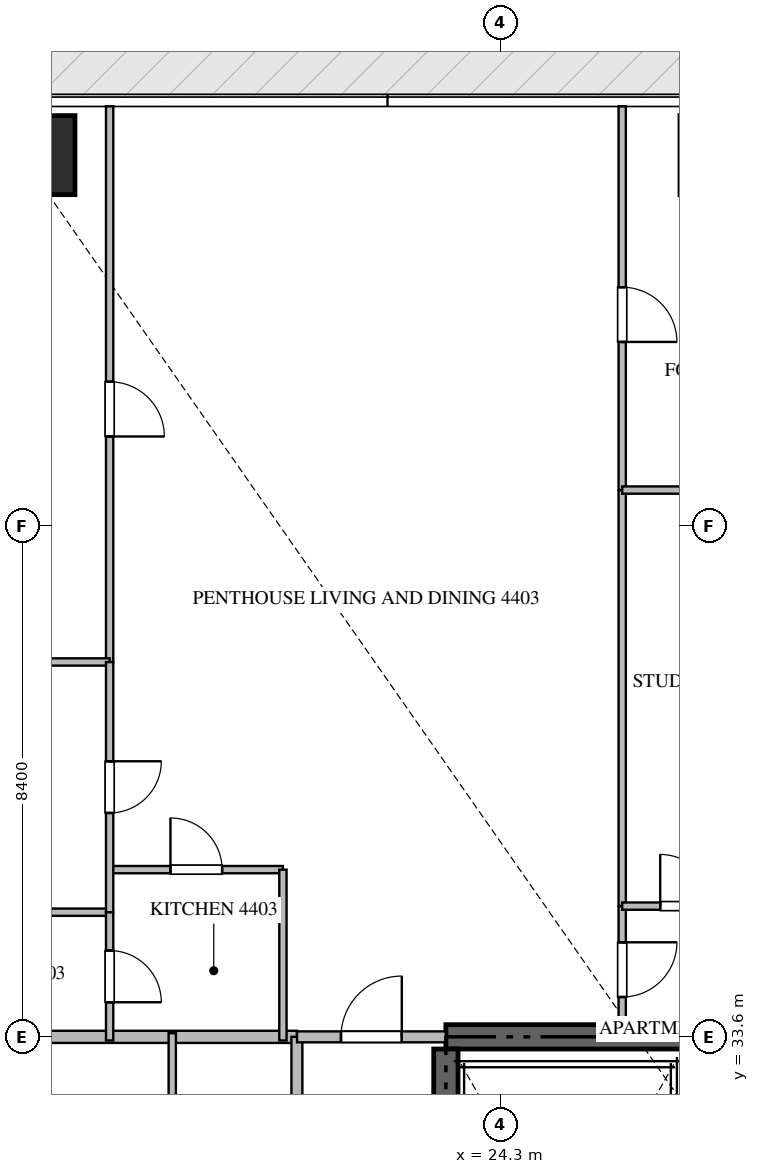
"""IFC4 building model, lengths in metres.
Left out: names, types, materials, properties, quantities, classifications, styles, units other than length and angle.
Written with IfcOpenShell. Run it as: python <this file> out.ifc"""

import sys

from ifc_helpers import new_model, si_unit, direction, frame, frame_2d, origin, origin_2d, place, context, subcontext, project, spatial, rectangle, extrude, source, transform, mapped, element, fill, save


model = new_model("IFC4")
c1 = context("Model", 3, precision=1e-05, world=origin(), true_north=direction((0.0, 1.0)))
c2 = subcontext(c1, "Body", "Model", "MODEL_VIEW")
j1 = project(units=[si_unit("LENGTHUNIT", "METRE"), si_unit("PLANEANGLEUNIT", "RADIAN")], contexts=[c1])
p1 = place(None, origin())
s1 = spatial("IfcSite", under=j1, at=p1, CompositionType="ELEMENT")
p2 = place(p1, origin())
s2 = spatial("IfcBuilding", under=s1, at=p2, CompositionType="ELEMENT")
p3 = place(p2, frame((0.0, 0.0, 176.4)))
s3 = spatial("IfcBuildingStorey", under=s2, at=p3, CompositionType="ELEMENT", Elevation=176.4)
p4 = place(p3, frame((41.4, 33.6, -0.26), z_axis=(0.0, 0.0, 1.0), x_axis=(-1.0, 0.0, 0.0)))
e1 = element("IfcWall", 1, at=p4, inside=s3, PredefinedType="SHEAR", context=c2, shape_type="SweptSolid", body=[
    extrude(rectangle(XDim=18.0, YDim=0.4, at=frame_2d((9.0, 0.0))), origin(), (0.0, 0.0, 1.0), 3.748),
])
p5 = place(p3, frame((23.4, 24.25, -0.26), z_axis=(0.0, 0.0, 1.0), x_axis=(0.0, 1.0, 0.0)))
e2 = element("IfcWall", 2, at=p5, inside=s3, PredefinedType="SHEAR", context=c2, shape_type="SweptSolid", body=[
    extrude(rectangle(XDim=9.15, YDim=0.4, at=frame_2d((4.575, 0.0))), origin(), (0.0, 0.0, 1.0), 3.748),
])
m1 = source(origin(), c2, "Body", "SweptSolid", [
    extrude(rectangle(XDim=1.3, YDim=1.3, at=origin_2d()), origin(), (0.0, 0.0, 1.0), 3.75),
])
p6 = place(p3, frame((16.65, 48.1, -0.26), z_axis=(0.0, 0.0, 1.0), x_axis=(1.0, 0.0, 0.0)))
e3 = element("IfcColumn", 3, at=p6, inside=s3, PredefinedType="COLUMN", context=c2, shape_type="MappedRepresentation", body=[
    mapped(m1, transform((0.0, 0.0, 0.0), scale=1.0)),
])
p7 = place(p3, frame((7.882, 33.6, 0.0), z_axis=(0.0, 0.0, 1.0), x_axis=(1.0, 0.0, 0.0)))
e4 = element("IfcWall", 4, at=p7, inside=s3, PredefinedType="PARTITIONING", context=c2, shape_type="SweptSolid", body=[
    extrude(rectangle(XDim=13.068, YDim=0.2, at=frame_2d((6.534, 0.0))), origin(), (0.0, 0.0, 1.0), 3.49),
])
p8 = place(p3, frame((20.95, 14.9, 0.0), z_axis=(0.0, 0.0, 1.0), x_axis=(0.0, 1.0, 0.0)))
e5 = element("IfcWall", 5, at=p8, inside=s3, PredefinedType="PARTITIONING", context=c2, shape_type="SweptSolid", body=[
    extrude(rectangle(XDim=18.7, YDim=0.18, at=frame_2d((9.35, 0.0))), origin(), (0.0, 0.0, 1.0), 3.49),
])
p9 = place(p8, frame((5.522, 0.0, 0.0)))
e6 = element("IfcOpeningElement", 6, at=p9, cuts=e5, PredefinedType="OPENING", context=c2, shape_type="SweptSolid", body=[
    extrude(rectangle(XDim=1.0, YDim=2.15, at=frame_2d((0.5, 1.075))), frame((0.0, 0.1, 0.0), z_axis=(0.0, -1.0, 0.0), x_axis=(1.0, 0.0, 0.0)), (0.0, 0.0, 1.0), 0.2),
])
p10 = place(p8, frame((10.602, 0.0, 0.0)))
e7 = element("IfcOpeningElement", 7, at=p10, cuts=e5, PredefinedType="OPENING", context=c2, shape_type="SweptSolid", body=[
    extrude(rectangle(XDim=1.0, YDim=2.15, at=frame_2d((0.5, 1.075))), frame((0.0, 0.1, 0.0), z_axis=(0.0, -1.0, 0.0), x_axis=(1.0, 0.0, 0.0)), (0.0, 0.0, 1.0), 0.2),
])
p11 = place(p3, frame((20.952, 33.6, 0.0), z_axis=(0.0, 0.0, 1.0), x_axis=(1.0, 0.0, 0.0)))
e8 = element("IfcWall", 8, at=p11, inside=s3, PredefinedType="PARTITIONING", context=c2, shape_type="SweptSolid", body=[
    extrude(rectangle(XDim=2.446, YDim=0.18, at=frame_2d((1.223, 0.0))), origin(), (0.0, 0.0, 1.0), 3.49),
])
p12 = place(p11, frame((0.723, 0.0, 0.0)))
e9 = element("IfcOpeningElement", 9, at=p12, cuts=e8, PredefinedType="OPENING", context=c2, shape_type="SweptSolid", body=[
    extrude(rectangle(XDim=1.0, YDim=2.15, at=frame_2d((0.5, 1.075))), frame((0.0, 0.1, 0.0), z_axis=(0.0, -1.0, 0.0), x_axis=(1.0, 0.0, 0.0)), (0.0, 0.0, 1.0), 0.2),
])
p13 = place(p3, frame((17.87, 36.35, 0.0), z_axis=(0.0, 0.0, 1.0), x_axis=(1.0, 0.0, 0.0)))
e10 = element("IfcWall", 10, at=p13, inside=s3, PredefinedType="PARTITIONING", context=c2, shape_type="SweptSolid", body=[
    extrude(rectangle(XDim=2.85, YDim=0.12, at=frame_2d((1.425, 0.0))), origin(), (0.0, 0.0, 1.0), 3.49),
])
p14 = place(p13, frame((1.0, 0.0, 0.0)))
e11 = element("IfcOpeningElement", 11, at=p14, cuts=e10, PredefinedType="OPENING", context=c2, shape_type="SweptSolid", body=[
    extrude(rectangle(XDim=0.85, YDim=2.1, at=frame_2d((0.425, 1.05))), frame((0.0, 0.07, 0.0), z_axis=(0.0, -1.0, 0.0), x_axis=(1.0, 0.0, 0.0)), (0.0, 0.0, 1.0), 0.14),
])
p15 = place(p3, frame((20.72, 36.35, 0.0), z_axis=(0.0, 0.0, 1.0), x_axis=(0.0, -1.0, 0.0)))
e12 = element("IfcWall", 12, at=p15, inside=s3, PredefinedType="PARTITIONING", context=c2, shape_type="SweptSolid", body=[
    extrude(rectangle(XDim=2.81, YDim=0.12, at=frame_2d((1.405, 0.0))), origin(), (0.0, 0.0, 1.0), 3.49),
])
p16 = place(p3, frame((17.87, 48.905, 0.0), z_axis=(0.0, 0.0, 1.0), x_axis=(0.0, -1.0, 0.0)))
e13 = element("IfcWall", 13, at=p16, inside=s3, PredefinedType="PARTITIONING", context=c2, shape_type="SweptSolid", body=[
    extrude(rectangle(XDim=9.14, YDim=0.12, at=frame_2d((4.57, 0.0))), origin(), (0.0, 0.0, 1.0), 3.49),
])
p17 = place(p16, frame((4.532, 0.0, 0.0)))
e14 = element("IfcOpeningElement", 14, at=p17, cuts=e13, PredefinedType="OPENING", context=c2, shape_type="SweptSolid", body=[
    extrude(rectangle(XDim=0.9, YDim=2.1, at=frame_2d((0.45, 1.05))), frame((0.0, 0.07, 0.0), z_axis=(0.0, -1.0, 0.0), x_axis=(1.0, 0.0, 0.0)), (0.0, 0.0, 1.0), 0.14),
])
p18 = place(p3, frame((7.895, 39.765, 0.0), z_axis=(0.0, 0.0, 1.0), x_axis=(1.0, 0.0, 0.0)))
e15 = element("IfcWall", 15, at=p18, inside=s3, PredefinedType="PARTITIONING", context=c2, shape_type="SweptSolid", body=[
    extrude(rectangle(XDim=9.975, YDim=0.12, at=frame_2d((4.988, 0.0))), origin(), (0.0, 0.0, 1.0), 3.49),
])
p19 = place(p3, frame((14.67, 35.65, 0.0), z_axis=(0.0, 0.0, 1.0), x_axis=(1.0, 0.0, 0.0)))
e16 = element("IfcWall", 16, at=p19, inside=s3, PredefinedType="PARTITIONING", context=c2, shape_type="SweptSolid", body=[
    extrude(rectangle(XDim=3.2, YDim=0.12, at=frame_2d((1.6, 0.0))), origin(), (0.0, 0.0, 1.0), 3.49),
])
p20 = place(p3, frame((17.87, 39.763, 0.0), z_axis=(0.0, 0.0, 1.0), x_axis=(0.0, -1.0, 0.0)))
e17 = element("IfcWall", 17, at=p20, inside=s3, PredefinedType="PARTITIONING", context=c2, shape_type="SweptSolid", body=[
    extrude(rectangle(XDim=4.113, YDim=0.12, at=frame_2d((2.057, 0.0))), origin(), (0.0, 0.0, 1.0), 3.49),
])
p21 = place(p20, frame((1.631, 0.0, 0.0)))
e18 = element("IfcOpeningElement", 18, at=p21, cuts=e17, PredefinedType="OPENING", context=c2, shape_type="SweptSolid", body=[
    extrude(rectangle(XDim=0.85, YDim=2.1, at=frame_2d((0.425, 1.05))), frame((0.0, 0.07, 0.0), z_axis=(0.0, -1.0, 0.0), x_axis=(1.0, 0.0, 0.0)), (0.0, 0.0, 1.0), 0.14),
])
p22 = place(p3, frame((17.87, 35.648, 0.0), z_axis=(0.0, 0.0, 1.0), x_axis=(0.0, -1.0, 0.0)))
e19 = element("IfcWall", 19, at=p22, inside=s3, PredefinedType="PARTITIONING", context=c2, shape_type="SweptSolid", body=[
    extrude(rectangle(XDim=2.108, YDim=0.12, at=frame_2d((1.054, 0.0))), origin(), (0.0, 0.0, 1.0), 3.49),
])
p23 = place(p22, frame((0.629, 0.0, 0.0)))
e20 = element("IfcOpeningElement", 20, at=p23, cuts=e19, PredefinedType="OPENING", context=c2, shape_type="SweptSolid", body=[
    extrude(rectangle(XDim=0.85, YDim=2.1, at=frame_2d((0.425, 1.05))), frame((0.0, 0.07, 0.0), z_axis=(0.0, -1.0, 0.0), x_axis=(1.0, 0.0, 0.0)), (0.0, 0.0, 1.0), 0.14),
])
p24 = place(p3, frame((26.3, 35.75, 0.0), z_axis=(0.0, 0.0, 1.0), x_axis=(0.0, -1.0, 0.0)))
e21 = element("IfcWall", 21, at=p24, inside=s3, PredefinedType="PARTITIONING", context=c2, shape_type="SweptSolid", body=[
    extrude(rectangle(XDim=1.95, YDim=0.12, at=frame_2d((0.975, 0.0))), origin(), (0.0, 0.0, 1.0), 3.49),
])
p25 = place(p24, frame((0.595, 0.0, 0.0)))
e22 = element("IfcOpeningElement", 22, at=p25, cuts=e21, PredefinedType="OPENING", context=c2, shape_type="SweptSolid", body=[
    extrude(rectangle(XDim=0.9, YDim=2.1, at=frame_2d((0.45, 1.05))), frame((0.0, 0.07, 0.0), z_axis=(0.0, -1.0, 0.0), x_axis=(1.0, 0.0, 0.0)), (0.0, 0.0, 1.0), 0.14),
])
p26 = place(p3, frame((26.3, 48.905, 0.0), z_axis=(0.0, 0.0, 1.0), x_axis=(0.0, -1.0, 0.0)))
e23 = element("IfcWall", 23, at=p26, inside=s3, PredefinedType="PARTITIONING", context=c2, shape_type="SweptSolid", body=[
    extrude(rectangle(XDim=6.313, YDim=0.12, at=frame_2d((3.156, 0.0))), origin(), (0.0, 0.0, 1.0), 3.49),
])
p27 = place(p26, frame((2.977, 0.0, 0.0)))
e24 = element("IfcOpeningElement", 24, at=p27, cuts=e23, PredefinedType="OPENING", context=c2, shape_type="SweptSolid", body=[
    extrude(rectangle(XDim=0.9, YDim=2.1, at=frame_2d((0.45, 1.05))), frame((0.0, 0.07, 0.0), z_axis=(0.0, -1.0, 0.0), x_axis=(1.0, 0.0, 0.0)), (0.0, 0.0, 1.0), 0.14),
])
p28 = place(p3, frame((26.3, 42.59, 0.0), z_axis=(0.0, 0.0, 1.0), x_axis=(0.0, -1.0, 0.0)))
e25 = element("IfcWall", 25, at=p28, inside=s3, PredefinedType="PARTITIONING", context=c2, shape_type="SweptSolid", body=[
    extrude(rectangle(XDim=6.838, YDim=0.12, at=frame_2d((3.419, 0.0))), origin(), (0.0, 0.0, 1.0), 3.49),
])
p29 = place(p3, frame((26.3, 42.592, 0.0), z_axis=(0.0, 0.0, 1.0), x_axis=(1.0, 0.0, 0.0)))
e26 = element("IfcWall", 26, at=p29, inside=s3, PredefinedType="PARTITIONING", context=c2, shape_type="SweptSolid", body=[
    extrude(rectangle(XDim=5.12, YDim=0.12, at=frame_2d((2.56, 0.0))), origin(), (0.0, 0.0, 1.0), 3.49),
])
p30 = place(p3, frame((26.3, 35.75, 0.0), z_axis=(0.0, 0.0, 1.0), x_axis=(1.0, 0.0, 0.0)))
e27 = element("IfcWall", 27, at=p30, inside=s3, PredefinedType="PARTITIONING", context=c2, shape_type="SweptSolid", body=[
    extrude(rectangle(XDim=2.1, YDim=0.12, at=frame_2d((1.05, 0.0))), origin(), (0.0, 0.0, 1.0), 3.49),
])
p31 = place(p30, frame((0.625, 0.0, 0.0)))
e28 = element("IfcOpeningElement", 28, at=p31, cuts=e27, PredefinedType="OPENING", context=c2, shape_type="SweptSolid", body=[
    extrude(rectangle(XDim=0.85, YDim=2.1, at=frame_2d((0.425, 1.05))), frame((0.0, 0.07, 0.0), z_axis=(0.0, -1.0, 0.0), x_axis=(1.0, 0.0, 0.0)), (0.0, 0.0, 1.0), 0.14),
])
p32 = place(p3, frame((18.9, 27.8, 0.0), z_axis=(0.0, 0.0, 1.0), x_axis=(0.0, 1.0, 0.0)))
e29 = element("IfcWall", 29, at=p32, inside=s3, PredefinedType="PARTITIONING", context=c2, shape_type="SweptSolid", body=[
    extrude(rectangle(XDim=5.86, YDim=0.12, at=frame_2d((2.93, 0.0))), origin(), (0.0, 0.0, 1.0), 3.49),
])
m2 = source(origin(), c2, "Body", "SweptSolid", [
    extrude(rectangle(XDim=1.0, YDim=2.15, at=frame_2d((0.5, 1.075))), frame((0.0, 0.025, 0.0), z_axis=(0.0, -1.0, 0.0), x_axis=(1.0, 0.0, 0.0)), (0.0, 0.0, 1.0), 0.05),
])
p33 = place(p12, origin())
e30 = element("IfcDoor", 30, at=p33, inside=s3, OperationType="SINGLE_SWING_RIGHT", PredefinedType="DOOR", context=c2, shape_type="MappedRepresentation", body=[
    mapped(m2, transform((0.0, 0.0, 0.0), scale=1.0)),
])
fill(e9, e30)
m3 = source(origin(), c2, "Body", "SweptSolid", [
    extrude(rectangle(XDim=0.85, YDim=2.1, at=frame_2d((0.425, 1.05))), frame((0.0, 0.025, 0.0), z_axis=(0.0, -1.0, 0.0), x_axis=(1.0, 0.0, 0.0)), (0.0, 0.0, 1.0), 0.05),
])
p34 = place(p14, origin())
e31 = element("IfcDoor", 31, at=p34, inside=s3, OperationType="SINGLE_SWING_LEFT", PredefinedType="DOOR", context=c2, shape_type="MappedRepresentation", body=[
    mapped(m3, transform((0.0, 0.0, 0.0), scale=1.0)),
])
fill(e11, e31)
m4 = source(origin(), c2, "Body", "SweptSolid", [
    extrude(rectangle(XDim=0.9, YDim=2.1, at=frame_2d((0.45, 1.05))), frame((0.0, 0.025, 0.0), z_axis=(0.0, -1.0, 0.0), x_axis=(1.0, 0.0, 0.0)), (0.0, 0.0, 1.0), 0.05),
])
p35 = place(p17, origin())
e32 = element("IfcDoor", 32, at=p35, inside=s3, OperationType="SINGLE_SWING_RIGHT", PredefinedType="DOOR", context=c2, shape_type="MappedRepresentation", body=[
    mapped(m4, transform((0.0, 0.0, 0.0), scale=1.0)),
])
fill(e14, e32)
p36 = place(p21, origin())
e33 = element("IfcDoor", 33, at=p36, inside=s3, OperationType="SINGLE_SWING_LEFT", PredefinedType="DOOR", context=c2, shape_type="MappedRepresentation", body=[
    mapped(m3, transform((0.0, 0.0, 0.0), scale=1.0)),
])
fill(e18, e33)
p37 = place(p23, origin())
e34 = element("IfcDoor", 34, at=p37, inside=s3, OperationType="SINGLE_SWING_RIGHT", PredefinedType="DOOR", context=c2, shape_type="MappedRepresentation", body=[
    mapped(m3, transform((0.0, 0.0, 0.0), scale=1.0)),
])
fill(e20, e34)
p38 = place(p25, origin())
e35 = element("IfcDoor", 35, at=p38, inside=s3, OperationType="SINGLE_SWING_LEFT", PredefinedType="DOOR", context=c2, shape_type="MappedRepresentation", body=[
    mapped(m4, transform((0.0, 0.0, 0.0), scale=1.0)),
])
fill(e22, e35)
p39 = place(p27, origin())
e36 = element("IfcDoor", 36, at=p39, inside=s3, OperationType="SINGLE_SWING_RIGHT", PredefinedType="DOOR", context=c2, shape_type="MappedRepresentation", body=[
    mapped(m4, transform((0.0, 0.0, 0.0), scale=1.0)),
])
fill(e24, e36)
p40 = place(p31, origin())
e37 = element("IfcDoor", 37, at=p40, inside=s3, OperationType="SINGLE_SWING_LEFT", PredefinedType="DOOR", context=c2, shape_type="MappedRepresentation", body=[
    mapped(m3, transform((0.0, 0.0, 0.0), scale=1.0)),
])
fill(e28, e37)
save(model, sys.argv[1])
